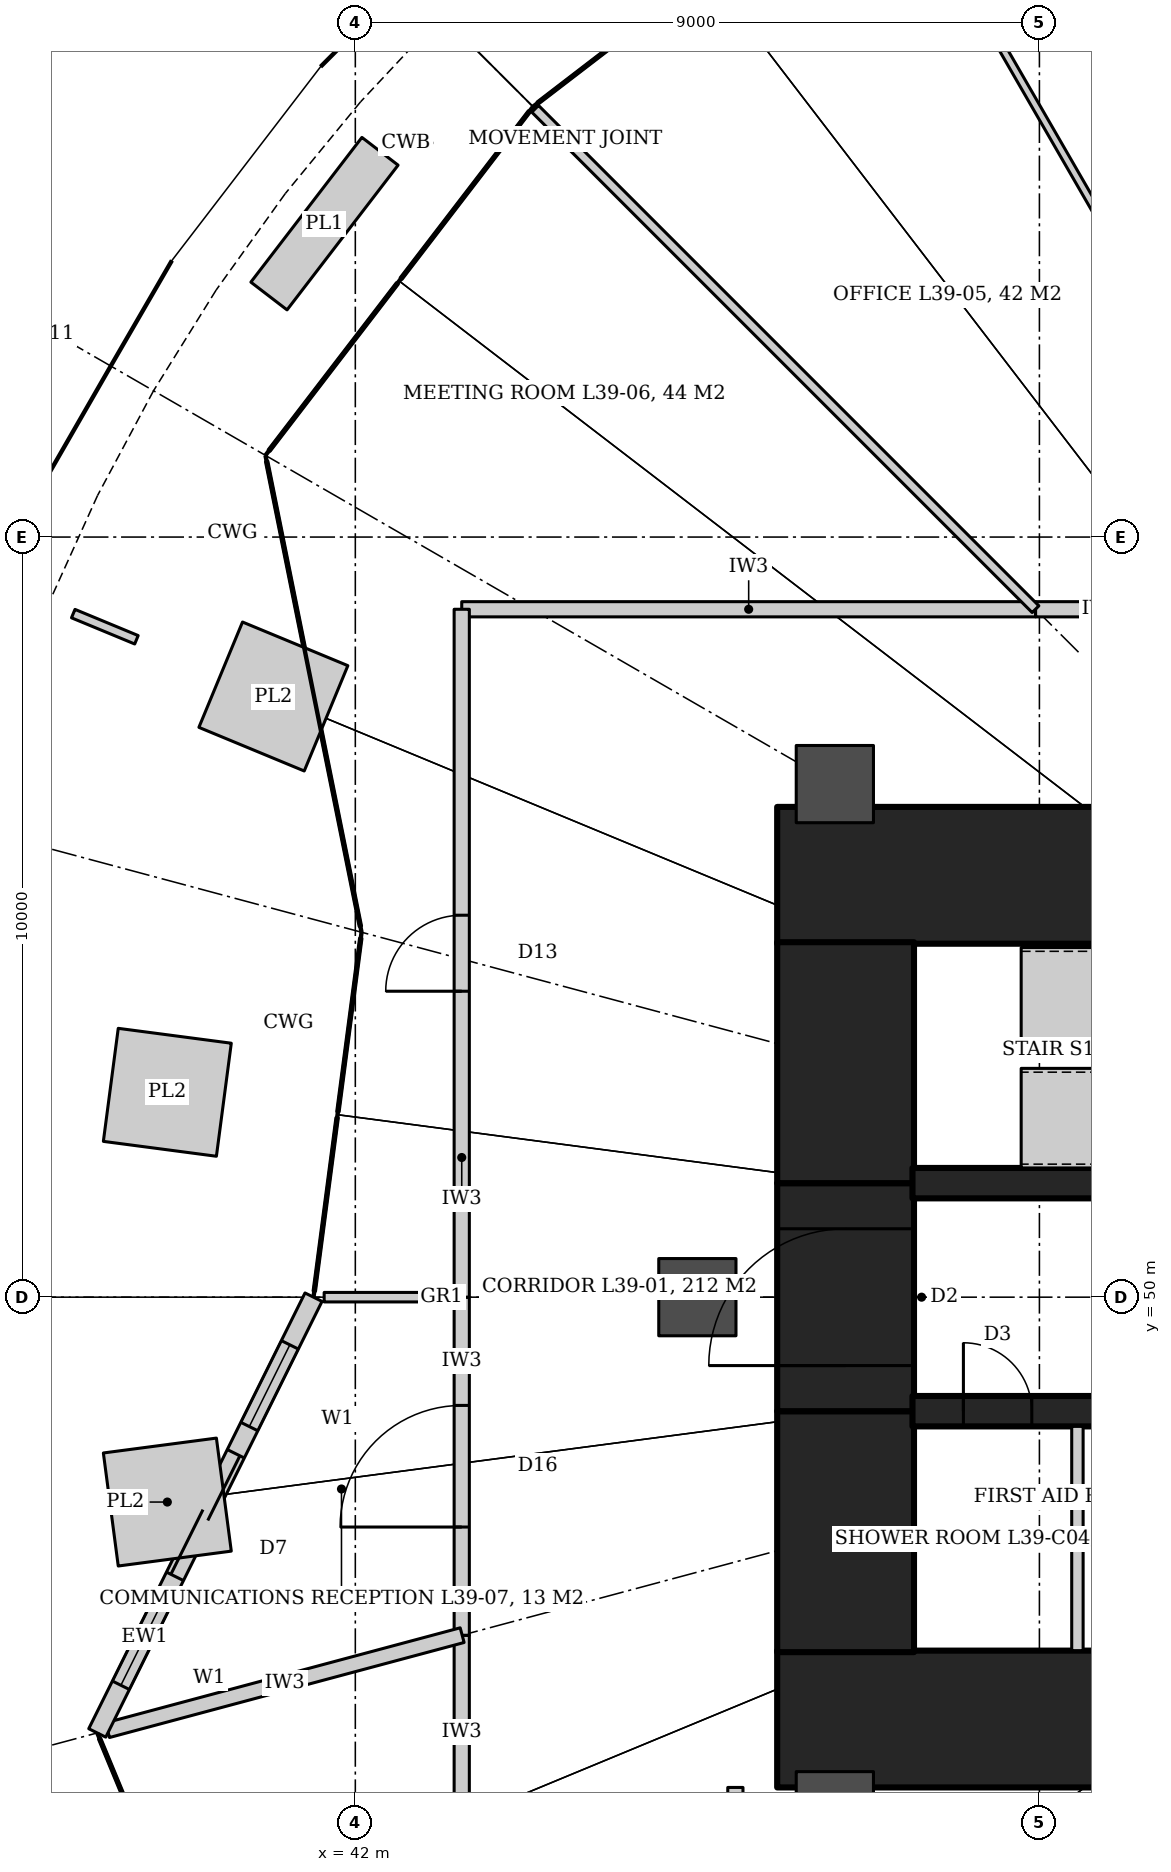
"""IFC4 building model, lengths in metres.
Left out: names, types, materials, properties, quantities, classifications, styles, units other than length and angle.
Written with IfcOpenShell. Run it as: python <this file> out.ifc"""

import sys

from ifc_helpers import new_model, si_unit, direction, frame, frame_2d, origin, origin_2d, place, context, subcontext, project, spatial, rectangle, hollow_circle, extrude, element, fill, save


model = new_model("IFC4")
c1 = context("Model", 3, precision=1e-05, world=origin(), true_north=direction((0.0, 1.0)))
c2 = subcontext(c1, "Body", "Model", "MODEL_VIEW")
j1 = project(units=[si_unit("LENGTHUNIT", "METRE"), si_unit("PLANEANGLEUNIT", "RADIAN")], contexts=[c1])
p1 = place(None, origin())
s1 = spatial("IfcSite", under=j1, at=p1, CompositionType="ELEMENT")
p2 = place(p1, origin())
s2 = spatial("IfcBuilding", under=s1, at=p2, CompositionType="ELEMENT")
p3 = place(p2, frame((0.0, 0.0, 173.0)))
s3 = spatial("IfcBuildingStorey", under=s2, at=p3, CompositionType="ELEMENT", Elevation=173.0)
for number, where, z_axis, x_axis in (
    (1, (47.55, 55.55, 0.0), (0.0, 0.0, 1.0), (1.0, 0.0, 0.0)),
    (2, (47.55, 44.45, 0.0), (0.0, 0.0, 1.0), (1.0, 0.0, 0.0)),
):
    element("IfcWall", number, at=place(p3, frame(where, z_axis=z_axis, x_axis=x_axis)), inside=s3, PredefinedType="SHEAR", context=c2, shape_type="SweptSolid", body=[
        extrude(rectangle(XDim=7.85, YDim=1.8, at=frame_2d((3.925, 0.0))), origin(), (0.0, 0.0, 1.0), 4.2),
    ])
p4 = place(p3, frame((48.45, 45.33, 0.0), z_axis=(0.0, 0.0, 1.0), x_axis=(0.0, 1.0, 0.0)))
e3 = element("IfcWall", 3, at=p4, inside=s3, PredefinedType="SHEAR", context=c2, shape_type="SweptSolid", body=[
    extrude(rectangle(XDim=3.17, YDim=1.8, at=frame_2d((1.585, 0.0))), origin(), (0.0, 0.0, 1.0), 4.2),
])
p5 = place(p3, frame((48.45, 48.5, 0.0), z_axis=(0.0, 0.0, 1.0), x_axis=(0.0, 1.0, 0.0)))
e4 = element("IfcWall", 4, at=p5, inside=s3, PredefinedType="SHEAR", context=c2, shape_type="SweptSolid", body=[
    extrude(rectangle(XDim=3.0, YDim=1.8, at=frame_2d((1.5, 0.0))), origin(), (0.0, 0.0, 1.0), 4.2),
])
p6 = place(p5, frame((0.6, 0.0, 0.0)))
e5 = element("IfcOpeningElement", 5, at=p6, cuts=e4, PredefinedType="OPENING", context=c2, shape_type="SweptSolid", body=[
    extrude(rectangle(XDim=1.8, YDim=2.1, at=frame_2d((0.9, 1.05))), frame((0.0, 0.91, 0.0), z_axis=(0.0, -1.0, 0.0), x_axis=(1.0, 0.0, 0.0)), (0.0, 0.0, 1.0), 1.82),
])
p7 = place(p3, frame((48.45, 51.5, 0.0), z_axis=(0.0, 0.0, 1.0), x_axis=(0.0, 1.0, 0.0)))
e6 = element("IfcWall", 6, at=p7, inside=s3, PredefinedType="SHEAR", context=c2, shape_type="SweptSolid", body=[
    extrude(rectangle(XDim=3.17, YDim=1.8, at=frame_2d((1.585, 0.0))), origin(), (0.0, 0.0, 1.0), 4.2),
])
p8 = place(p3, frame((49.33, 51.5, 0.0), z_axis=(0.0, 0.0, 1.0), x_axis=(1.0, 0.0, 0.0)))
e7 = element("IfcWall", 7, at=p8, inside=s3, PredefinedType="SHEAR", context=c2, shape_type="SweptSolid", body=[
    extrude(rectangle(XDim=6.07, YDim=0.4, at=frame_2d((3.035, 0.0))), origin(), (0.0, 0.0, 1.0), 4.2),
])
p9 = place(p8, frame((4.57, 0.0, 0.0)))
e8 = element("IfcOpeningElement", 8, at=p9, cuts=e7, PredefinedType="OPENING", context=c2, shape_type="SweptSolid", body=[
    extrude(rectangle(XDim=1.0, YDim=2.1, at=frame_2d((0.5, 1.05))), frame((0.0, 0.21, 0.0), z_axis=(0.0, -1.0, 0.0), x_axis=(1.0, 0.0, 0.0)), (0.0, 0.0, 1.0), 0.42),
])
p10 = place(p3, frame((49.33, 48.5, 0.0), z_axis=(0.0, 0.0, 1.0), x_axis=(1.0, 0.0, 0.0)))
e9 = element("IfcWall", 9, at=p10, inside=s3, PredefinedType="SHEAR", context=c2, shape_type="SweptSolid", body=[
    extrude(rectangle(XDim=6.07, YDim=0.4, at=frame_2d((3.035, 0.0))), origin(), (0.0, 0.0, 1.0), 4.2),
])
p11 = place(p10, frame((0.67, 0.0, 0.0)))
e10 = element("IfcOpeningElement", 10, at=p11, cuts=e9, PredefinedType="OPENING", context=c2, shape_type="SweptSolid", body=[
    extrude(rectangle(XDim=0.9, YDim=2.1, at=frame_2d((0.45, 1.05))), frame((0.0, 0.21, 0.0), z_axis=(0.0, -1.0, 0.0), x_axis=(1.0, 0.0, 0.0)), (0.0, 0.0, 1.0), 0.42),
])
p12 = place(p10, frame((2.52, 0.0, 0.0)))
e11 = element("IfcOpeningElement", 11, at=p12, cuts=e9, PredefinedType="OPENING", context=c2, shape_type="SweptSolid", body=[
    extrude(rectangle(XDim=0.9, YDim=2.1, at=frame_2d((0.45, 1.05))), frame((0.0, 0.21, 0.0), z_axis=(0.0, -1.0, 0.0), x_axis=(1.0, 0.0, 0.0)), (0.0, 0.0, 1.0), 0.42),
])
p13 = place(p10, frame((4.32, 0.0, 0.0)))
e12 = element("IfcOpeningElement", 12, at=p13, cuts=e9, PredefinedType="OPENING", context=c2, shape_type="SweptSolid", body=[
    extrude(rectangle(XDim=1.0, YDim=2.1, at=frame_2d((0.5, 1.05))), frame((0.0, 0.21, 0.0), z_axis=(0.0, -1.0, 0.0), x_axis=(1.0, 0.0, 0.0)), (0.0, 0.0, 1.0), 0.42),
])
for number, where, z_axis, x_axis in (
    (13, (48.309, 56.75, 0.0), (0.0, 0.0, 1.0), (1.0, 0.0, 0.0)),
    (14, (46.5, 50.0, 0.0), (0.0, 0.0, 1.0), (1.0, 0.0, 0.0)),
    (15, (48.309, 43.25, 0.0), (0.0, 0.0, 1.0), (1.0, 0.0, 0.0)),
):
    element("IfcColumn", number, at=place(p3, frame(where, z_axis=z_axis, x_axis=x_axis)), inside=s3, PredefinedType="COLUMN", context=c2, shape_type="SweptSolid", body=[
        extrude(hollow_circle(Radius=0.508, WallThickness=0.05, at=origin_2d()), origin(), (0.0, 0.0, 1.0), 4.2),
    ])
p14 = place(p3, frame((43.4, 59.05, 0.0), z_axis=(0.0, 0.0, 1.0), x_axis=(1.0, 0.0, 0.0)))
e16 = element("IfcWall", 16, at=p14, inside=s3, PredefinedType="PARTITIONING", context=c2, shape_type="SweptSolid", body=[
    extrude(rectangle(XDim=7.55, YDim=0.2, at=frame_2d((3.775, 0.0))), origin(), (0.0, 0.0, 1.0), 3.012),
])
p15 = place(p3, frame((50.95, 59.05, 0.0), z_axis=(0.0, 0.0, 1.0), x_axis=(1.0, 0.0, 0.0)))
e17 = element("IfcWall", 17, at=p15, inside=s3, PredefinedType="PARTITIONING", context=c2, shape_type="SweptSolid", body=[
    extrude(rectangle(XDim=3.825, YDim=0.2, at=frame_2d((1.913, 0.0))), origin(), (0.0, 0.0, 1.0), 3.02),
])
p16 = place(p15, frame((1.462, 0.0, 0.0)))
e18 = element("IfcOpeningElement", 18, at=p16, cuts=e17, PredefinedType="OPENING", context=c2, shape_type="SweptSolid", body=[
    extrude(rectangle(XDim=0.9, YDim=2.4, at=frame_2d((0.45, 1.2))), frame((0.0, 0.11, 0.0), z_axis=(0.0, -1.0, 0.0), x_axis=(1.0, 0.0, 0.0)), (0.0, 0.0, 1.0), 0.22),
])
p17 = place(p3, frame((47.0, 43.55, 0.0), z_axis=(0.0, 0.0, 1.0), x_axis=(0.0, -1.0, 0.0)))
e19 = element("IfcWall", 19, at=p17, inside=s3, PredefinedType="PARTITIONING", context=c2, shape_type="SweptSolid", body=[
    extrude(rectangle(XDim=1.056, YDim=0.2, at=frame_2d((0.528, 0.0))), origin(), (0.0, 0.0, 1.0), 3.012),
])
p18 = place(p3, frame((43.4, 40.416, 0.0), z_axis=(0.0, 0.0, 1.0), x_axis=(0.0, 1.0, 0.0)))
e20 = element("IfcWall", 20, at=p18, inside=s3, PredefinedType="PARTITIONING", context=c2, shape_type="SweptSolid", body=[
    extrude(rectangle(XDim=5.136, YDim=0.2, at=frame_2d((2.568, 0.0))), origin(), (0.0, 0.0, 1.0), 3.012),
])
p19 = place(p18, frame((2.118, 0.0, 0.0)))
e21 = element("IfcOpeningElement", 21, at=p19, cuts=e20, PredefinedType="OPENING", context=c2, shape_type="SweptSolid", body=[
    extrude(rectangle(XDim=0.9, YDim=2.4, at=frame_2d((0.45, 1.2))), frame((0.0, 0.11, 0.0), z_axis=(0.0, -1.0, 0.0), x_axis=(1.0, 0.0, 0.0)), (0.0, 0.0, 1.0), 0.22),
])
p20 = place(p3, frame((43.4, 45.552, 0.0), z_axis=(0.0, 0.0, 1.0), x_axis=(0.0, 1.0, 0.0)))
e22 = element("IfcWall", 22, at=p20, inside=s3, PredefinedType="PARTITIONING", context=c2, shape_type="SweptSolid", body=[
    extrude(rectangle(XDim=4.448, YDim=0.2, at=frame_2d((2.224, 0.0))), origin(), (0.0, 0.0, 1.0), 3.012),
])
p21 = place(p20, frame((1.424, 0.0, 0.0)))
e23 = element("IfcOpeningElement", 23, at=p21, cuts=e22, PredefinedType="OPENING", context=c2, shape_type="SweptSolid", body=[
    extrude(rectangle(XDim=1.6, YDim=2.4, at=frame_2d((0.8, 1.2))), frame((0.0, 0.11, 0.0), z_axis=(0.0, -1.0, 0.0), x_axis=(1.0, 0.0, 0.0)), (0.0, 0.0, 1.0), 0.22),
])
p22 = place(p3, frame((43.4, 50.0, 0.0), z_axis=(0.0, 0.0, 1.0), x_axis=(0.0, 1.0, 0.0)))
e24 = element("IfcWall", 24, at=p22, inside=s3, PredefinedType="PARTITIONING", context=c2, shape_type="SweptSolid", body=[
    extrude(rectangle(XDim=9.05, YDim=0.2, at=frame_2d((4.525, 0.0))), origin(), (0.0, 0.0, 1.0), 3.012),
])
p23 = place(p22, frame((4.025, 0.0, 0.0)))
e25 = element("IfcOpeningElement", 25, at=p23, cuts=e24, PredefinedType="OPENING", context=c2, shape_type="SweptSolid", body=[
    extrude(rectangle(XDim=1.0, YDim=2.4, at=frame_2d((0.5, 1.2))), frame((0.0, 0.11, 0.0), z_axis=(0.0, -1.0, 0.0), x_axis=(1.0, 0.0, 0.0)), (0.0, 0.0, 1.0), 0.22),
])
p24 = place(p3, frame((52.916, 62.27, 0.0), z_axis=(0.0, 0.0, 1.0), x_axis=(-0.499997422768, 0.866026891745, 0.0)))
e26 = element("IfcWall", 26, at=p24, inside=s3, PredefinedType="PARTITIONING", context=c2, shape_type="SweptSolid", body=[
    extrude(rectangle(XDim=7.942, YDim=0.1, at=frame_2d((3.971, 0.0))), origin(), (0.0, 0.0, 1.0), 3.012),
])
p25 = place(p3, frame((50.949, 59.051, 0.0), z_axis=(0.0, 0.0, 1.0), x_axis=(-0.707106781187, 0.707106781187, 0.0)))
e27 = element("IfcWall", 27, at=p25, inside=s3, PredefinedType="PARTITIONING", context=c2, shape_type="SweptSolid", body=[
    extrude(rectangle(XDim=9.31, YDim=0.125, at=frame_2d((4.655, 0.0))), origin(), (0.0, 0.0, 1.0), 3.012),
])
p26 = place(p3, frame((43.4, 50.0, 0.0), z_axis=(0.0, 0.0, 1.0), x_axis=(-1.0, 0.0, 0.0)))
e28 = element("IfcWall", 28, at=p26, inside=s3, PredefinedType="PARTITIONING", context=c2, shape_type="SweptSolid", body=[
    extrude(rectangle(XDim=1.81, YDim=0.125, at=frame_2d((0.905, 0.0))), origin(), (0.0, 0.0, 1.0), 3.012),
])
p27 = place(p3, frame((43.406, 45.553, 0.0), z_axis=(0.0, 0.0, 1.0), x_axis=(-0.965932258808, -0.25879503742, 0.0)))
e29 = element("IfcWall", 29, at=p27, inside=s3, PredefinedType="PARTITIONING", context=c2, shape_type="SweptSolid", body=[
    extrude(rectangle(XDim=4.83, YDim=0.2, at=frame_2d((2.415, 0.0))), origin(), (0.0, 0.0, 1.0), 3.012),
])
p28 = place(p3, frame((41.45, 50.0, 0.0), z_axis=(0.0, 0.0, 1.0), x_axis=(-0.444556644785, -0.895750740763, 0.0)))
e30 = element("IfcWall", 30, at=p28, inside=s3, PredefinedType="SOLIDWALL", context=c2, shape_type="SweptSolid", body=[
    extrude(rectangle(XDim=6.4, YDim=0.25, at=frame_2d((3.2, 0.0))), origin(), (0.0, 0.0, 1.0), 4.04),
])
p29 = place(p28, frame((2.3, 0.0, 0.0)))
e31 = element("IfcOpeningElement", 31, at=p29, cuts=e30, PredefinedType="OPENING", context=c2, shape_type="SweptSolid", body=[
    extrude(rectangle(XDim=1.8, YDim=2.4, at=frame_2d((0.9, 1.2))), frame((0.0, 0.135, 0.0), z_axis=(0.0, -1.0, 0.0), x_axis=(1.0, 0.0, 0.0)), (0.0, 0.0, 1.0), 0.27),
])
p30 = place(p28, frame((0.7, 0.0, 0.0)))
e32 = element("IfcOpeningElement", 32, at=p30, cuts=e30, PredefinedType="OPENING", context=c2, shape_type="SweptSolid", body=[
    extrude(rectangle(XDim=1.2, YDim=2.4, at=frame_2d((0.6, 1.2))), frame((0.0, 0.135, 0.0), z_axis=(0.0, -1.0, 0.0), x_axis=(1.0, 0.0, 0.0)), (0.0, 0.0, 1.0), 0.27),
])
p31 = place(p28, frame((4.5, 0.0, 0.0)))
e33 = element("IfcOpeningElement", 33, at=p31, cuts=e30, PredefinedType="OPENING", context=c2, shape_type="SweptSolid", body=[
    extrude(rectangle(XDim=1.2, YDim=2.4, at=frame_2d((0.6, 1.2))), frame((0.0, 0.135, 0.0), z_axis=(0.0, -1.0, 0.0), x_axis=(1.0, 0.0, 0.0)), (0.0, 0.0, 1.0), 0.27),
])
p32 = place(p3, frame((51.5, 45.35, 0.0), z_axis=(0.0, 0.0, 1.0), x_axis=(0.0, 1.0, 0.0)))
e34 = element("IfcWall", 34, at=p32, inside=s3, PredefinedType="PARTITIONING", context=c2, shape_type="SweptSolid", body=[
    extrude(rectangle(XDim=2.95, YDim=0.15, at=frame_2d((1.475, 0.0))), origin(), (0.0, 0.0, 1.0), 4.04),
])
p33 = place(p23, origin())
e35 = element("IfcDoor", 35, at=p33, inside=s3, OperationType="SINGLE_SWING_LEFT", PredefinedType="DOOR", context=c2, shape_type="SweptSolid", body=[
    extrude(rectangle(XDim=1.0, YDim=2.4, at=frame_2d((0.5, 1.2))), frame((0.0, 0.025, 0.0), z_axis=(0.0, -1.0, 0.0), x_axis=(1.0, 0.0, 0.0)), (0.0, 0.0, 1.0), 0.05),
])
fill(e25, e35)
p34 = place(p21, origin())
e36 = element("IfcDoor", 36, at=p34, inside=s3, OperationType="DOUBLE_DOOR_DOUBLE_SWING", PredefinedType="DOOR", context=c2, shape_type="SweptSolid", body=[
    extrude(rectangle(XDim=1.6, YDim=2.4, at=frame_2d((0.8, 1.2))), frame((0.0, 0.025, 0.0), z_axis=(0.0, -1.0, 0.0), x_axis=(1.0, 0.0, 0.0)), (0.0, 0.0, 1.0), 0.05),
])
fill(e23, e36)
p35 = place(p29, origin())
e37 = element("IfcDoor", 37, at=p35, inside=s3, OperationType="DOUBLE_DOOR_SLIDING", PredefinedType="DOOR", context=c2, shape_type="SweptSolid", body=[
    extrude(rectangle(XDim=1.8, YDim=2.4, at=frame_2d((0.9, 1.2))), frame((0.0, 0.025, 0.0), z_axis=(0.0, -1.0, 0.0), x_axis=(1.0, 0.0, 0.0)), (0.0, 0.0, 1.0), 0.05),
])
fill(e31, e37)
p36 = place(p30, origin())
e38 = element("IfcWindow", 38, at=p36, inside=s3, PartitioningType="SINGLE_PANEL", PredefinedType="WINDOW", context=c2, shape_type="SweptSolid", body=[
    extrude(rectangle(XDim=1.2, YDim=2.4, at=frame_2d((0.6, 1.2))), frame((0.0, 0.03, 0.0), z_axis=(0.0, -1.0, 0.0), x_axis=(1.0, 0.0, 0.0)), (0.0, 0.0, 1.0), 0.06),
])
fill(e32, e38)
p37 = place(p31, origin())
e39 = element("IfcWindow", 39, at=p37, inside=s3, PartitioningType="SINGLE_PANEL", PredefinedType="WINDOW", context=c2, shape_type="SweptSolid", body=[
    extrude(rectangle(XDim=1.2, YDim=2.4, at=frame_2d((0.6, 1.2))), frame((0.0, 0.03, 0.0), z_axis=(0.0, -1.0, 0.0), x_axis=(1.0, 0.0, 0.0)), (0.0, 0.0, 1.0), 0.06),
])
fill(e33, e39)
p38 = place(p11, origin())
e40 = element("IfcDoor", 40, at=p38, inside=s3, OperationType="SINGLE_SWING_RIGHT", PredefinedType="DOOR", context=c2, shape_type="SweptSolid", body=[
    extrude(rectangle(XDim=0.9, YDim=2.1, at=frame_2d((0.45, 1.05))), frame((0.0, 0.025, 0.0), z_axis=(0.0, -1.0, 0.0), x_axis=(1.0, 0.0, 0.0)), (0.0, 0.0, 1.0), 0.05),
])
fill(e10, e40)
p39 = place(p6, origin())
e41 = element("IfcDoor", 41, at=p39, inside=s3, OperationType="DOUBLE_DOOR_DOUBLE_SWING", PredefinedType="DOOR", context=c2, shape_type="SweptSolid", body=[
    extrude(rectangle(XDim=1.8, YDim=2.1, at=frame_2d((0.9, 1.05))), frame((0.0, 0.025, 0.0), z_axis=(0.0, -1.0, 0.0), x_axis=(1.0, 0.0, 0.0)), (0.0, 0.0, 1.0), 0.05),
])
fill(e5, e41)
save(model, sys.argv[1])
